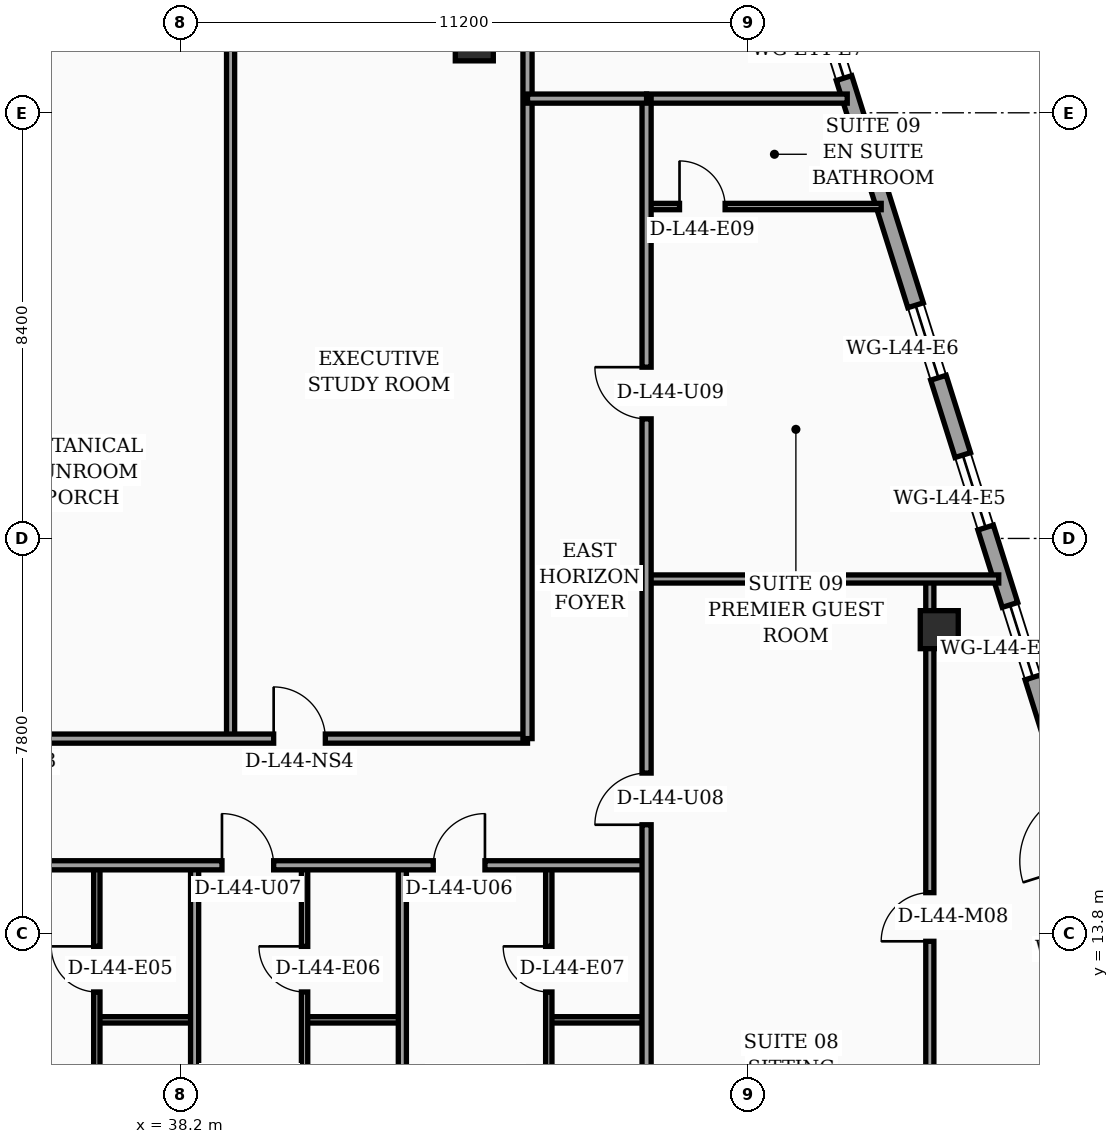
"""IFC4 building model, lengths in metres.
Left out: names, types, materials, properties, quantities, classifications, styles, units other than length and angle.
Written with IfcOpenShell. Run it as: python <this file> out.ifc"""

import sys

from ifc_helpers import new_model, si_unit, direction, frame, frame_2d, origin, origin_2d, place, context, subcontext, project, spatial, rectangle, hollow_rectangle, extrude, element, fill, save


model = new_model("IFC4")
c1 = context("Model", 3, precision=1e-05, world=origin(), true_north=direction((0.0, 1.0)))
c2 = subcontext(c1, "Body", "Model", "MODEL_VIEW")
j1 = project(units=[si_unit("LENGTHUNIT", "METRE"), si_unit("PLANEANGLEUNIT", "RADIAN")], contexts=[c1])
p1 = place(None, origin())
s1 = spatial("IfcSite", under=j1, at=p1, CompositionType="ELEMENT")
p2 = place(p1, origin())
s2 = spatial("IfcBuilding", under=s1, at=p2, CompositionType="ELEMENT")
p3 = place(p2, frame((0.0, 0.0, 178.9)))
s3 = spatial("IfcBuildingStorey", under=s2, at=p3, CompositionType="ELEMENT", Elevation=178.9)
for number, where, z_axis, x_axis in (
    (1, (44.0, 31.4, 0.0), (0.0, 0.0, 1.0), (1.0, 0.0, 0.0)),
    (2, (53.176, 19.8, 0.0), (0.0, 0.0, 1.0), (1.0, 0.0, 0.0)),
):
    element("IfcColumn", number, at=place(p3, frame(where, z_axis=z_axis, x_axis=x_axis)), inside=s3, PredefinedType="COLUMN", context=c2, shape_type="SweptSolid", body=[
        extrude(hollow_rectangle(XDim=0.75, YDim=0.75, WallThickness=0.032, at=origin_2d()), origin(), (0.0, 0.0, 1.0), 3.56),
    ])
p4 = place(p3, frame((59.23, 5.505, 0.0), z_axis=(0.0, 0.0, 1.0), x_axis=(-0.300509063924, 0.953778958931, 0.0)))
e3 = element("IfcWall", 3, at=p4, inside=s3, PredefinedType="SOLIDWALL", context=c2, shape_type="SweptSolid", body=[
    extrude(rectangle(XDim=30.814, YDim=0.32, at=frame_2d((15.407, 0.0))), origin(), (0.0, 0.0, 1.0), 3.56),
])
p5 = place(p4, frame((10.199, 0.0, 0.0)))
e4 = element("IfcOpeningElement", 4, at=p5, cuts=e3, PredefinedType="OPENING", context=c2, shape_type="SweptSolid", body=[
    extrude(rectangle(XDim=1.4, YDim=2.25, at=frame_2d((0.7, 1.125))), frame((0.0, 0.17, 0.0), z_axis=(0.0, -1.0, 0.0), x_axis=(1.0, 0.0, 0.0)), (0.0, 0.0, 1.0), 0.34),
])
p6 = place(p4, frame((2.65, 0.0, 0.75)))
e5 = element("IfcOpeningElement", 5, at=p6, cuts=e3, PredefinedType="OPENING", context=c2, shape_type="SweptSolid", body=[
    extrude(rectangle(XDim=1.5, YDim=1.6, at=frame_2d((0.75, 0.8))), frame((0.0, 0.17, 0.0), z_axis=(0.0, -1.0, 0.0), x_axis=(1.0, 0.0, 0.0)), (0.0, 0.0, 1.0), 0.34),
])
p7 = place(p4, frame((4.7, 0.0, 0.75)))
e6 = element("IfcOpeningElement", 6, at=p7, cuts=e3, PredefinedType="OPENING", context=c2, shape_type="SweptSolid", body=[
    extrude(rectangle(XDim=1.5, YDim=1.6, at=frame_2d((0.75, 0.8))), frame((0.0, 0.17, 0.0), z_axis=(0.0, -1.0, 0.0), x_axis=(1.0, 0.0, 0.0)), (0.0, 0.0, 1.0), 0.34),
])
p8 = place(p4, frame((7.8, 0.0, 0.75)))
e7 = element("IfcOpeningElement", 7, at=p8, cuts=e3, PredefinedType="OPENING", context=c2, shape_type="SweptSolid", body=[
    extrude(rectangle(XDim=1.5, YDim=1.6, at=frame_2d((0.75, 0.8))), frame((0.0, 0.17, 0.0), z_axis=(0.0, -1.0, 0.0), x_axis=(1.0, 0.0, 0.0)), (0.0, 0.0, 1.0), 0.34),
])
p9 = place(p4, frame((14.0, 0.0, 0.75)))
e8 = element("IfcOpeningElement", 8, at=p9, cuts=e3, PredefinedType="OPENING", context=c2, shape_type="SweptSolid", body=[
    extrude(rectangle(XDim=1.5, YDim=1.6, at=frame_2d((0.75, 0.8))), frame((0.0, 0.17, 0.0), z_axis=(0.0, -1.0, 0.0), x_axis=(1.0, 0.0, 0.0)), (0.0, 0.0, 1.0), 0.34),
])
p10 = place(p4, frame((17.1, 0.0, 0.75)))
e9 = element("IfcOpeningElement", 9, at=p10, cuts=e3, PredefinedType="OPENING", context=c2, shape_type="SweptSolid", body=[
    extrude(rectangle(XDim=1.5, YDim=1.6, at=frame_2d((0.75, 0.8))), frame((0.0, 0.17, 0.0), z_axis=(0.0, -1.0, 0.0), x_axis=(1.0, 0.0, 0.0)), (0.0, 0.0, 1.0), 0.34),
])
p11 = place(p4, frame((20.2, 0.0, 0.75)))
e10 = element("IfcOpeningElement", 10, at=p11, cuts=e3, PredefinedType="OPENING", context=c2, shape_type="SweptSolid", body=[
    extrude(rectangle(XDim=1.5, YDim=1.6, at=frame_2d((0.75, 0.8))), frame((0.0, 0.17, 0.0), z_axis=(0.0, -1.0, 0.0), x_axis=(1.0, 0.0, 0.0)), (0.0, 0.0, 1.0), 0.34),
])
p12 = place(p4, frame((26.4, 0.0, 0.75)))
e11 = element("IfcOpeningElement", 11, at=p12, cuts=e3, PredefinedType="OPENING", context=c2, shape_type="SweptSolid", body=[
    extrude(rectangle(XDim=1.5, YDim=1.6, at=frame_2d((0.75, 0.8))), frame((0.0, 0.17, 0.0), z_axis=(0.0, -1.0, 0.0), x_axis=(1.0, 0.0, 0.0)), (0.0, 0.0, 1.0), 0.34),
])
p13 = place(p3, frame((36.55, 12.1, 0.0), z_axis=(0.0, 0.0, 1.0), x_axis=(1.0, 0.0, 0.0)))
e12 = element("IfcWall", 12, at=p13, inside=s3, PredefinedType="PARTITIONING", context=c2, shape_type="SweptSolid", body=[
    extrude(rectangle(XDim=1.93, YDim=0.125, at=frame_2d((0.965, 0.0))), origin(), (0.0, 0.0, 1.0), 3.56),
])
p14 = place(p3, frame((36.55, 2.44, 0.0), z_axis=(0.0, 0.0, 1.0), x_axis=(0.0, 1.0, 0.0)))
e13 = element("IfcWall", 13, at=p14, inside=s3, PredefinedType="PARTITIONING", context=c2, shape_type="SweptSolid", body=[
    extrude(rectangle(XDim=12.71, YDim=0.125, at=frame_2d((6.355, 0.0))), origin(), (0.0, 0.0, 1.0), 2.94),
])
p15 = place(p14, frame((4.35, 0.0, 0.0)))
e14 = element("IfcOpeningElement", 14, at=p15, cuts=e13, PredefinedType="OPENING", context=c2, shape_type="SweptSolid", body=[
    extrude(rectangle(XDim=0.96, YDim=2.2, at=frame_2d((0.48, 1.1))), frame((0.0, 0.073, 0.0), z_axis=(0.0, -1.0, 0.0), x_axis=(1.0, 0.0, 0.0)), (0.0, 0.0, 1.0), 0.145),
])
p16 = place(p14, frame((10.21, 0.0, 0.0)))
e15 = element("IfcOpeningElement", 15, at=p16, cuts=e13, PredefinedType="OPENING", context=c2, shape_type="SweptSolid", body=[
    extrude(rectangle(XDim=0.9, YDim=2.15, at=frame_2d((0.45, 1.075))), frame((0.0, 0.073, 0.0), z_axis=(0.0, -1.0, 0.0), x_axis=(1.0, 0.0, 0.0)), (0.0, 0.0, 1.0), 0.145),
])
p17 = place(p3, frame((40.65, 12.1, 0.0), z_axis=(0.0, 0.0, 1.0), x_axis=(1.0, 0.0, 0.0)))
e16 = element("IfcWall", 16, at=p17, inside=s3, PredefinedType="PARTITIONING", context=c2, shape_type="SweptSolid", body=[
    extrude(rectangle(XDim=1.93, YDim=0.125, at=frame_2d((0.965, 0.0))), origin(), (0.0, 0.0, 1.0), 3.56),
])
p18 = place(p3, frame((40.65, 2.44, 0.0), z_axis=(0.0, 0.0, 1.0), x_axis=(0.0, 1.0, 0.0)))
e17 = element("IfcWall", 17, at=p18, inside=s3, PredefinedType="PARTITIONING", context=c2, shape_type="SweptSolid", body=[
    extrude(rectangle(XDim=12.71, YDim=0.125, at=frame_2d((6.355, 0.0))), origin(), (0.0, 0.0, 1.0), 2.94),
])
p19 = place(p18, frame((4.35, 0.0, 0.0)))
e18 = element("IfcOpeningElement", 18, at=p19, cuts=e17, PredefinedType="OPENING", context=c2, shape_type="SweptSolid", body=[
    extrude(rectangle(XDim=0.96, YDim=2.2, at=frame_2d((0.48, 1.1))), frame((0.0, 0.073, 0.0), z_axis=(0.0, -1.0, 0.0), x_axis=(1.0, 0.0, 0.0)), (0.0, 0.0, 1.0), 0.145),
])
p20 = place(p18, frame((10.21, 0.0, 0.0)))
e19 = element("IfcOpeningElement", 19, at=p20, cuts=e17, PredefinedType="OPENING", context=c2, shape_type="SweptSolid", body=[
    extrude(rectangle(XDim=0.9, YDim=2.15, at=frame_2d((0.45, 1.075))), frame((0.0, 0.073, 0.0), z_axis=(0.0, -1.0, 0.0), x_axis=(1.0, 0.0, 0.0)), (0.0, 0.0, 1.0), 0.145),
])
p21 = place(p3, frame((38.48, 2.44, 0.0), z_axis=(0.0, 0.0, 1.0), x_axis=(0.0, 1.0, 0.0)))
e20 = element("IfcWall", 20, at=p21, inside=s3, PredefinedType="PARTITIONING", context=c2, shape_type="SweptSolid", body=[
    extrude(rectangle(XDim=12.71, YDim=0.16, at=frame_2d((6.355, 0.0))), origin(), (0.0, 0.0, 1.0), 2.94),
])
p22 = place(p3, frame((45.47, 12.1, 0.0), z_axis=(0.0, 0.0, 1.0), x_axis=(1.0, 0.0, 0.0)))
e21 = element("IfcWall", 21, at=p22, inside=s3, PredefinedType="PARTITIONING", context=c2, shape_type="SweptSolid", body=[
    extrude(rectangle(XDim=1.93, YDim=0.125, at=frame_2d((0.965, 0.0))), origin(), (0.0, 0.0, 1.0), 2.94),
])
p23 = place(p3, frame((45.47, 2.44, 0.0), z_axis=(0.0, 0.0, 1.0), x_axis=(0.0, 1.0, 0.0)))
e22 = element("IfcWall", 22, at=p23, inside=s3, PredefinedType="PARTITIONING", context=c2, shape_type="SweptSolid", body=[
    extrude(rectangle(XDim=12.71, YDim=0.125, at=frame_2d((6.355, 0.0))), origin(), (0.0, 0.0, 1.0), 3.04),
])
p24 = place(p23, frame((4.35, 0.0, 0.0)))
e23 = element("IfcOpeningElement", 23, at=p24, cuts=e22, PredefinedType="OPENING", context=c2, shape_type="SweptSolid", body=[
    extrude(rectangle(XDim=0.96, YDim=2.2, at=frame_2d((0.48, 1.1))), frame((0.0, 0.073, 0.0), z_axis=(0.0, -1.0, 0.0), x_axis=(1.0, 0.0, 0.0)), (0.0, 0.0, 1.0), 0.145),
])
p25 = place(p23, frame((10.21, 0.0, 0.0)))
e24 = element("IfcOpeningElement", 24, at=p25, cuts=e22, PredefinedType="OPENING", context=c2, shape_type="SweptSolid", body=[
    extrude(rectangle(XDim=0.9, YDim=2.15, at=frame_2d((0.45, 1.075))), frame((0.0, 0.073, 0.0), z_axis=(0.0, -1.0, 0.0), x_axis=(1.0, 0.0, 0.0)), (0.0, 0.0, 1.0), 0.145),
])
p26 = place(p3, frame((42.58, 2.44, 0.0), z_axis=(0.0, 0.0, 1.0), x_axis=(0.0, 1.0, 0.0)))
e25 = element("IfcWall", 25, at=p26, inside=s3, PredefinedType="PARTITIONING", context=c2, shape_type="SweptSolid", body=[
    extrude(rectangle(XDim=12.71, YDim=0.16, at=frame_2d((6.355, 0.0))), origin(), (0.0, 0.0, 1.0), 3.04),
])
p27 = place(p3, frame((32.4, 15.15, 0.0), z_axis=(0.0, 0.0, 1.0), x_axis=(1.0, 0.0, 0.0)))
e26 = element("IfcWall", 26, at=p27, inside=s3, PredefinedType="PARTITIONING", context=c2, shape_type="SweptSolid", body=[
    extrude(rectangle(XDim=15.0, YDim=0.18, at=frame_2d((7.5, 0.0))), origin(), (0.0, 0.0, 1.0), 2.94),
])
p28 = place(p27, frame((1.66, 0.0, 0.0)))
e27 = element("IfcOpeningElement", 27, at=p28, cuts=e26, PredefinedType="OPENING", context=c2, shape_type="SweptSolid", body=[
    extrude(rectangle(XDim=1.02, YDim=2.2, at=frame_2d((0.51, 1.1))), frame((0.0, 0.1, 0.0), z_axis=(0.0, -1.0, 0.0), x_axis=(1.0, 0.0, 0.0)), (0.0, 0.0, 1.0), 0.2),
])
p29 = place(p27, frame((10.79, 0.0, 0.0)))
e28 = element("IfcOpeningElement", 28, at=p29, cuts=e26, PredefinedType="OPENING", context=c2, shape_type="SweptSolid", body=[
    extrude(rectangle(XDim=1.02, YDim=2.2, at=frame_2d((0.51, 1.1))), frame((0.0, 0.1, 0.0), z_axis=(0.0, -1.0, 0.0), x_axis=(1.0, 0.0, 0.0)), (0.0, 0.0, 1.0), 0.2),
])
p30 = place(p27, frame((6.62, 0.0, 0.0)))
e29 = element("IfcOpeningElement", 29, at=p30, cuts=e26, PredefinedType="OPENING", context=c2, shape_type="SweptSolid", body=[
    extrude(rectangle(XDim=1.02, YDim=2.2, at=frame_2d((0.51, 1.1))), frame((0.0, 0.1, 0.0), z_axis=(0.0, -1.0, 0.0), x_axis=(1.0, 0.0, 0.0)), (0.0, 0.0, 1.0), 0.2),
])
p31 = place(p3, frame((39.19, 17.65, 0.0), z_axis=(0.0, 0.0, 1.0), x_axis=(0.0, 1.0, 0.0)))
e30 = element("IfcWall", 30, at=p31, inside=s3, PredefinedType="PARTITIONING", context=c2, shape_type="SweptSolid", body=[
    extrude(rectangle(XDim=16.63, YDim=0.16, at=frame_2d((8.315, 0.0))), origin(), (0.0, 0.0, 1.0), 2.94),
])
p32 = place(p3, frame((21.5, 17.65, 0.0), z_axis=(0.0, 0.0, 1.0), x_axis=(1.0, 0.0, 0.0)))
e31 = element("IfcWall", 31, at=p32, inside=s3, PredefinedType="PARTITIONING", context=c2, shape_type="SweptSolid", body=[
    extrude(rectangle(XDim=23.55, YDim=0.18, at=frame_2d((11.775, 0.0))), origin(), (0.0, 0.0, 1.0), 2.94),
])
p33 = place(p32, frame((0.95, 0.0, 0.0)))
e32 = element("IfcOpeningElement", 32, at=p33, cuts=e31, PredefinedType="OPENING", context=c2, shape_type="SweptSolid", body=[
    extrude(rectangle(XDim=1.02, YDim=2.2, at=frame_2d((0.51, 1.1))), frame((0.0, 0.1, 0.0), z_axis=(0.0, -1.0, 0.0), x_axis=(1.0, 0.0, 0.0)), (0.0, 0.0, 1.0), 0.2),
])
p34 = place(p32, frame((7.46, 0.0, 0.0)))
e33 = element("IfcOpeningElement", 33, at=p34, cuts=e31, PredefinedType="OPENING", context=c2, shape_type="SweptSolid", body=[
    extrude(rectangle(XDim=1.02, YDim=2.2, at=frame_2d((0.51, 1.1))), frame((0.0, 0.1, 0.0), z_axis=(0.0, -1.0, 0.0), x_axis=(1.0, 0.0, 0.0)), (0.0, 0.0, 1.0), 0.2),
])
p35 = place(p32, frame((12.68, 0.0, 0.0)))
e34 = element("IfcOpeningElement", 34, at=p35, cuts=e31, PredefinedType="OPENING", context=c2, shape_type="SweptSolid", body=[
    extrude(rectangle(XDim=1.02, YDim=2.2, at=frame_2d((0.51, 1.1))), frame((0.0, 0.1, 0.0), z_axis=(0.0, -1.0, 0.0), x_axis=(1.0, 0.0, 0.0)), (0.0, 0.0, 1.0), 0.2),
])
p36 = place(p32, frame((18.54, 0.0, 0.0)))
e35 = element("IfcOpeningElement", 35, at=p36, cuts=e31, PredefinedType="OPENING", context=c2, shape_type="SweptSolid", body=[
    extrude(rectangle(XDim=1.02, YDim=2.2, at=frame_2d((0.51, 1.1))), frame((0.0, 0.1, 0.0), z_axis=(0.0, -1.0, 0.0), x_axis=(1.0, 0.0, 0.0)), (0.0, 0.0, 1.0), 0.2),
])
p37 = place(p3, frame((45.05, 17.65, 0.0), z_axis=(0.0, 0.0, 1.0), x_axis=(0.0, 1.0, 0.0)))
e36 = element("IfcWall", 36, at=p37, inside=s3, PredefinedType="PARTITIONING", context=c2, shape_type="SweptSolid", body=[
    extrude(rectangle(XDim=19.9, YDim=0.18, at=frame_2d((9.95, 0.0))), origin(), (0.0, 0.0, 1.0), 2.94),
])
p38 = place(p3, frame((52.99, 7.45, 0.0), z_axis=(0.0, 0.0, 1.0), x_axis=(0.0, 1.0, 0.0)))
e37 = element("IfcWall", 37, at=p38, inside=s3, PredefinedType="PARTITIONING", context=c2, shape_type="SweptSolid", body=[
    extrude(rectangle(XDim=13.35, YDim=0.16, at=frame_2d((6.675, 0.0))), origin(), (0.0, 0.0, 1.0), 2.94),
])
p39 = place(p38, frame((6.2, 0.0, 0.0)))
e38 = element("IfcOpeningElement", 38, at=p39, cuts=e37, PredefinedType="OPENING", context=c2, shape_type="SweptSolid", body=[
    extrude(rectangle(XDim=0.96, YDim=2.2, at=frame_2d((0.48, 1.1))), frame((0.0, 0.09, 0.0), z_axis=(0.0, -1.0, 0.0), x_axis=(1.0, 0.0, 0.0)), (0.0, 0.0, 1.0), 0.18),
])
p40 = place(p3, frame((47.4, 28.15, 0.0), z_axis=(0.0, 0.0, 1.0), x_axis=(1.0, 0.0, 0.0)))
e39 = element("IfcWall", 39, at=p40, inside=s3, PredefinedType="PARTITIONING", context=c2, shape_type="SweptSolid", body=[
    extrude(rectangle(XDim=4.63, YDim=0.125, at=frame_2d((2.315, 0.0))), origin(), (0.0, 0.0, 1.0), 3.04),
])
p41 = place(p40, frame((0.65, 0.0, 0.0)))
e40 = element("IfcOpeningElement", 40, at=p41, cuts=e39, PredefinedType="OPENING", context=c2, shape_type="SweptSolid", body=[
    extrude(rectangle(XDim=0.9, YDim=2.15, at=frame_2d((0.45, 1.075))), frame((0.0, 0.073, 0.0), z_axis=(0.0, -1.0, 0.0), x_axis=(1.0, 0.0, 0.0)), (0.0, 0.0, 1.0), 0.145),
])
p42 = place(p3, frame((47.4, 20.8, 0.0), z_axis=(0.0, 0.0, 1.0), x_axis=(1.0, 0.0, 0.0)))
e41 = element("IfcWall", 41, at=p42, inside=s3, PredefinedType="PARTITIONING", context=c2, shape_type="SweptSolid", body=[
    extrude(rectangle(XDim=6.95, YDim=0.16, at=frame_2d((3.475, 0.0))), origin(), (0.0, 0.0, 1.0), 3.04),
])
p43 = place(p3, frame((47.4, 30.28, 0.0), z_axis=(0.0, 0.0, 1.0), x_axis=(1.0, 0.0, 0.0)))
e42 = element("IfcWall", 42, at=p43, inside=s3, PredefinedType="PARTITIONING", context=c2, shape_type="SweptSolid", body=[
    extrude(rectangle(XDim=3.96, YDim=0.18, at=frame_2d((1.98, 0.0))), origin(), (0.0, 0.0, 1.0), 3.04),
])
p44 = place(p3, frame((47.4, 2.44, 0.0), z_axis=(0.0, 0.0, 1.0), x_axis=(0.0, 1.0, 0.0)))
e43 = element("IfcWall", 43, at=p44, inside=s3, PredefinedType="PARTITIONING", context=c2, shape_type="SweptSolid", body=[
    extrude(rectangle(XDim=27.84, YDim=0.18, at=frame_2d((13.92, 0.0))), origin(), (0.0, 0.0, 1.0), 2.94),
])
p45 = place(p44, frame((13.51, 0.0, 0.0)))
e44 = element("IfcOpeningElement", 44, at=p45, cuts=e43, PredefinedType="OPENING", context=c2, shape_type="SweptSolid", body=[
    extrude(rectangle(XDim=1.02, YDim=2.2, at=frame_2d((0.51, 1.1))), frame((0.0, 0.1, 0.0), z_axis=(0.0, -1.0, 0.0), x_axis=(1.0, 0.0, 0.0)), (0.0, 0.0, 1.0), 0.2),
])
p46 = place(p44, frame((21.52, 0.0, 0.0)))
e45 = element("IfcOpeningElement", 45, at=p46, cuts=e43, PredefinedType="OPENING", context=c2, shape_type="SweptSolid", body=[
    extrude(rectangle(XDim=1.02, YDim=2.2, at=frame_2d((0.51, 1.1))), frame((0.0, 0.1, 0.0), z_axis=(0.0, -1.0, 0.0), x_axis=(1.0, 0.0, 0.0)), (0.0, 0.0, 1.0), 0.2),
])
p47 = place(p3, frame((45.05, 30.28, 0.0), z_axis=(0.0, 0.0, 1.0), x_axis=(1.0, 0.0, 0.0)))
e46 = element("IfcWall", 46, at=p47, inside=s3, PredefinedType="PARTITIONING", context=c2, shape_type="SweptSolid", body=[
    extrude(rectangle(XDim=2.35, YDim=0.18, at=frame_2d((1.175, 0.0))), origin(), (0.0, 0.0, 1.0), 2.94),
])
p48 = place(p9, origin())
e47 = element("IfcWindow", 47, at=p48, inside=s3, PartitioningType="SINGLE_PANEL", PredefinedType="WINDOW", context=c2, shape_type="SweptSolid", body=[
    extrude(rectangle(XDim=1.5, YDim=1.6, at=frame_2d((0.75, 0.8))), frame((0.0, 0.03, 0.0), z_axis=(0.0, -1.0, 0.0), x_axis=(1.0, 0.0, 0.0)), (0.0, 0.0, 1.0), 0.06),
])
fill(e8, e47)
p49 = place(p10, origin())
e48 = element("IfcWindow", 48, at=p49, inside=s3, PartitioningType="SINGLE_PANEL", PredefinedType="WINDOW", context=c2, shape_type="SweptSolid", body=[
    extrude(rectangle(XDim=1.5, YDim=1.6, at=frame_2d((0.75, 0.8))), frame((0.0, 0.03, 0.0), z_axis=(0.0, -1.0, 0.0), x_axis=(1.0, 0.0, 0.0)), (0.0, 0.0, 1.0), 0.06),
])
fill(e9, e48)
p50 = place(p11, origin())
e49 = element("IfcWindow", 49, at=p50, inside=s3, PartitioningType="SINGLE_PANEL", PredefinedType="WINDOW", context=c2, shape_type="SweptSolid", body=[
    extrude(rectangle(XDim=1.5, YDim=1.6, at=frame_2d((0.75, 0.8))), frame((0.0, 0.03, 0.0), z_axis=(0.0, -1.0, 0.0), x_axis=(1.0, 0.0, 0.0)), (0.0, 0.0, 1.0), 0.06),
])
fill(e10, e49)
p51 = place(p12, origin())
e50 = element("IfcWindow", 50, at=p51, inside=s3, PartitioningType="SINGLE_PANEL", PredefinedType="WINDOW", context=c2, shape_type="SweptSolid", body=[
    extrude(rectangle(XDim=1.5, YDim=1.6, at=frame_2d((0.75, 0.8))), frame((0.0, 0.03, 0.0), z_axis=(0.0, -1.0, 0.0), x_axis=(1.0, 0.0, 0.0)), (0.0, 0.0, 1.0), 0.06),
])
fill(e11, e50)
p52 = place(p16, origin())
e51 = element("IfcDoor", 51, at=p52, inside=s3, OperationType="SINGLE_SWING_RIGHT", PredefinedType="DOOR", context=c2, shape_type="SweptSolid", body=[
    extrude(rectangle(XDim=0.9, YDim=2.15, at=frame_2d((0.45, 1.075))), frame((0.0, 0.025, 0.0), z_axis=(0.0, -1.0, 0.0), x_axis=(1.0, 0.0, 0.0)), (0.0, 0.0, 1.0), 0.05),
])
fill(e15, e51)
p53 = place(p20, origin())
e52 = element("IfcDoor", 52, at=p53, inside=s3, OperationType="SINGLE_SWING_RIGHT", PredefinedType="DOOR", context=c2, shape_type="SweptSolid", body=[
    extrude(rectangle(XDim=0.9, YDim=2.15, at=frame_2d((0.45, 1.075))), frame((0.0, 0.025, 0.0), z_axis=(0.0, -1.0, 0.0), x_axis=(1.0, 0.0, 0.0)), (0.0, 0.0, 1.0), 0.05),
])
fill(e19, e52)
p54 = place(p25, origin())
e53 = element("IfcDoor", 53, at=p54, inside=s3, OperationType="SINGLE_SWING_RIGHT", PredefinedType="DOOR", context=c2, shape_type="SweptSolid", body=[
    extrude(rectangle(XDim=0.9, YDim=2.15, at=frame_2d((0.45, 1.075))), frame((0.0, 0.025, 0.0), z_axis=(0.0, -1.0, 0.0), x_axis=(1.0, 0.0, 0.0)), (0.0, 0.0, 1.0), 0.05),
])
fill(e24, e53)
p55 = place(p29, origin())
e54 = element("IfcDoor", 54, at=p55, inside=s3, OperationType="SINGLE_SWING_RIGHT", PredefinedType="DOOR", context=c2, shape_type="SweptSolid", body=[
    extrude(rectangle(XDim=1.02, YDim=2.2, at=frame_2d((0.51, 1.1))), frame((0.0, 0.025, 0.0), z_axis=(0.0, -1.0, 0.0), x_axis=(1.0, 0.0, 0.0)), (0.0, 0.0, 1.0), 0.05),
])
fill(e28, e54)
p56 = place(p30, origin())
e55 = element("IfcDoor", 55, at=p56, inside=s3, OperationType="SINGLE_SWING_LEFT", PredefinedType="DOOR", context=c2, shape_type="SweptSolid", body=[
    extrude(rectangle(XDim=1.02, YDim=2.2, at=frame_2d((0.51, 1.1))), frame((0.0, 0.025, 0.0), z_axis=(0.0, -1.0, 0.0), x_axis=(1.0, 0.0, 0.0)), (0.0, 0.0, 1.0), 0.05),
])
fill(e29, e55)
p57 = place(p36, origin())
e56 = element("IfcDoor", 56, at=p57, inside=s3, OperationType="SINGLE_SWING_LEFT", PredefinedType="DOOR", context=c2, shape_type="SweptSolid", body=[
    extrude(rectangle(XDim=1.02, YDim=2.2, at=frame_2d((0.51, 1.1))), frame((0.0, 0.025, 0.0), z_axis=(0.0, -1.0, 0.0), x_axis=(1.0, 0.0, 0.0)), (0.0, 0.0, 1.0), 0.05),
])
fill(e35, e56)
p58 = place(p39, origin())
e57 = element("IfcDoor", 57, at=p58, inside=s3, OperationType="SINGLE_SWING_LEFT", PredefinedType="DOOR", context=c2, shape_type="SweptSolid", body=[
    extrude(rectangle(XDim=0.96, YDim=2.2, at=frame_2d((0.48, 1.1))), frame((0.0, 0.025, 0.0), z_axis=(0.0, -1.0, 0.0), x_axis=(1.0, 0.0, 0.0)), (0.0, 0.0, 1.0), 0.05),
])
fill(e38, e57)
p59 = place(p41, origin())
e58 = element("IfcDoor", 58, at=p59, inside=s3, OperationType="SINGLE_SWING_LEFT", PredefinedType="DOOR", context=c2, shape_type="SweptSolid", body=[
    extrude(rectangle(XDim=0.9, YDim=2.15, at=frame_2d((0.45, 1.075))), frame((0.0, 0.025, 0.0), z_axis=(0.0, -1.0, 0.0), x_axis=(1.0, 0.0, 0.0)), (0.0, 0.0, 1.0), 0.05),
])
fill(e40, e58)
p60 = place(p45, origin())
e59 = element("IfcDoor", 59, at=p60, inside=s3, OperationType="SINGLE_SWING_LEFT", PredefinedType="DOOR", context=c2, shape_type="SweptSolid", body=[
    extrude(rectangle(XDim=1.02, YDim=2.2, at=frame_2d((0.51, 1.1))), frame((0.0, 0.025, 0.0), z_axis=(0.0, -1.0, 0.0), x_axis=(1.0, 0.0, 0.0)), (0.0, 0.0, 1.0), 0.05),
])
fill(e44, e59)
p61 = place(p46, origin())
e60 = element("IfcDoor", 60, at=p61, inside=s3, OperationType="SINGLE_SWING_RIGHT", PredefinedType="DOOR", context=c2, shape_type="SweptSolid", body=[
    extrude(rectangle(XDim=1.02, YDim=2.2, at=frame_2d((0.51, 1.1))), frame((0.0, 0.025, 0.0), z_axis=(0.0, -1.0, 0.0), x_axis=(1.0, 0.0, 0.0)), (0.0, 0.0, 1.0), 0.05),
])
fill(e45, e60)
save(model, sys.argv[1])
